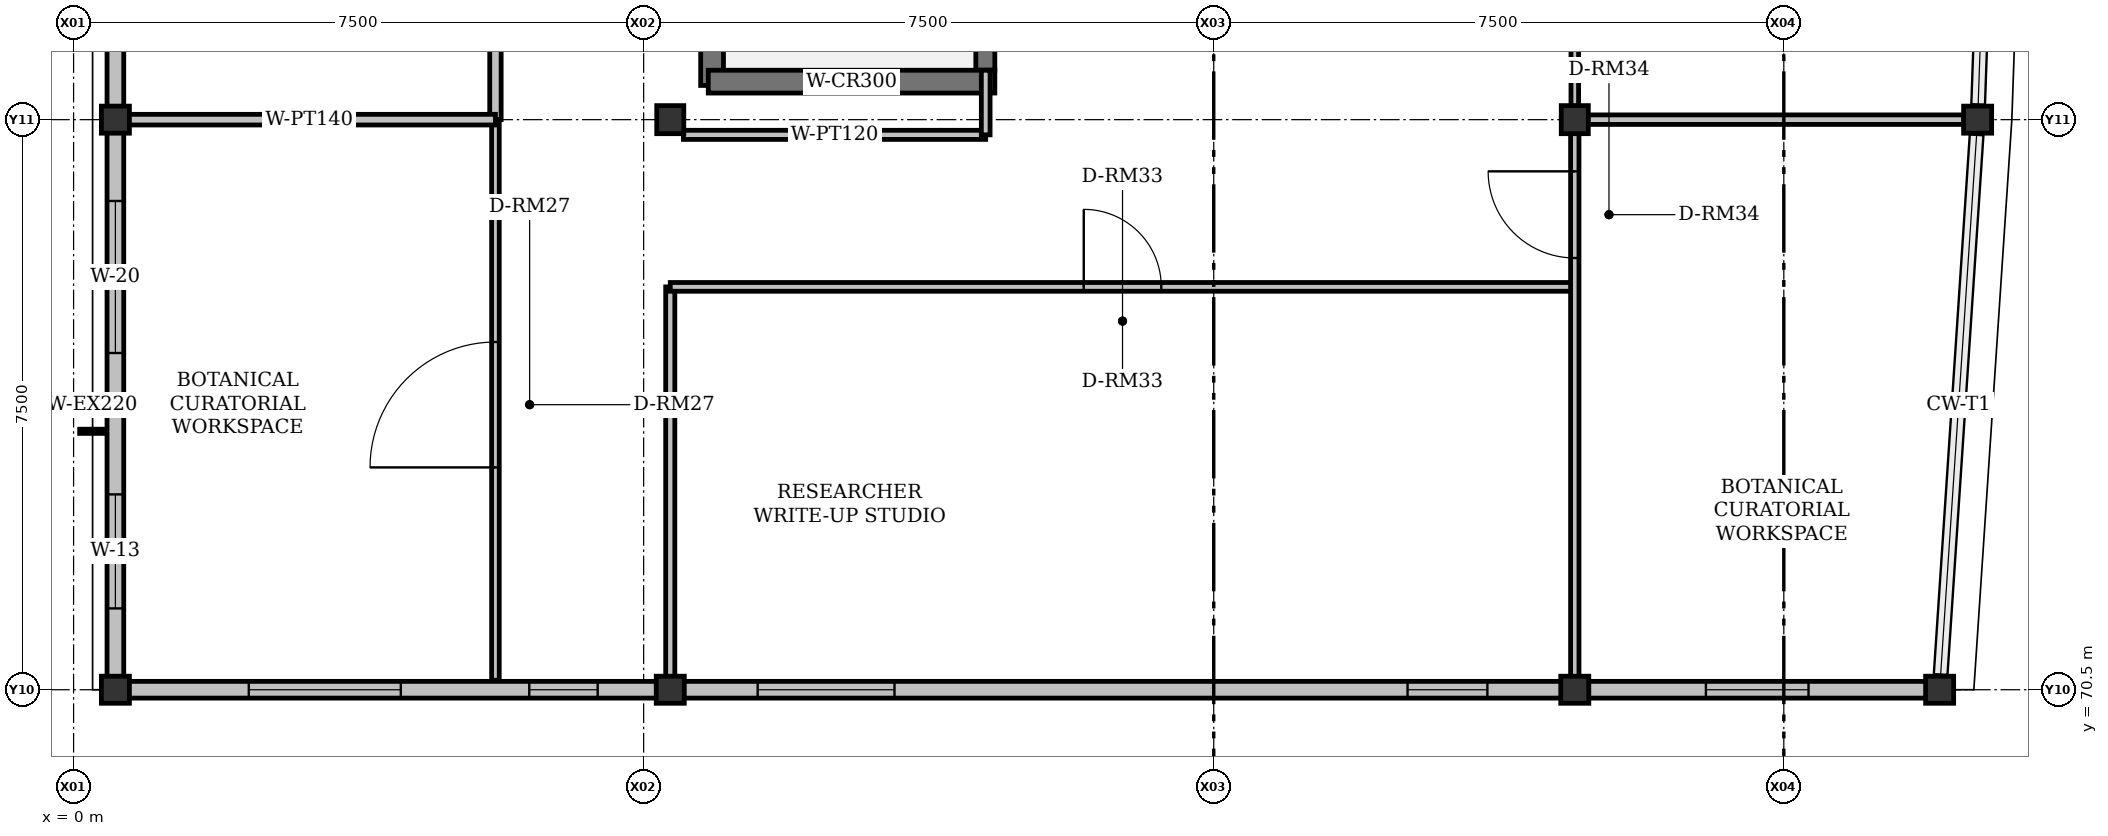
"""IFC4 building model, lengths in metres.
Left out: names, types, materials, properties, quantities, classifications, styles, units other than length and angle.
Written with IfcOpenShell. Run it as: python <this file> out.ifc"""

import sys

from ifc_helpers import new_model, si_unit, direction, frame, frame_2d, origin, origin_2d, place, context, subcontext, project, spatial, rectangle, i_section, extrude, element, fill, save


model = new_model("IFC4")
c1 = context("Model", 3, precision=1e-05, world=origin(), true_north=direction((0.0, 1.0)))
c2 = subcontext(c1, "Body", "Model", "MODEL_VIEW")
j1 = project(units=[si_unit("LENGTHUNIT", "METRE"), si_unit("PLANEANGLEUNIT", "RADIAN")], contexts=[c1])
p1 = place(None, origin())
s1 = spatial("IfcSite", under=j1, at=p1, CompositionType="ELEMENT")
p2 = place(p1, origin())
s2 = spatial("IfcBuilding", under=s1, at=p2, CompositionType="ELEMENT")
p3 = place(p2, frame((0.0, 0.0, 51.9)))
s3 = spatial("IfcBuildingStorey", under=s2, at=p3, CompositionType="ELEMENT", Elevation=51.9)
for number, where, z_axis, x_axis in (
    (1, (0.55, 70.5, 0.0), (0.0, 0.0, 1.0), (1.0, 0.0, 0.0)),
    (2, (7.85, 70.5, 0.0), (0.0, 0.0, 1.0), (1.0, 0.0, 0.0)),
    (3, (19.75, 70.5, 0.0), (0.0, 0.0, 1.0), (1.0, 0.0, 0.0)),
    (4, (24.55, 70.5, 0.0), (0.0, 0.0, 1.0), (1.0, 0.0, 0.0)),
    (5, (0.55, 78.0, 0.0), (0.0, 0.0, 1.0), (1.0, 0.0, 0.0)),
    (6, (7.85, 78.0, 0.0), (0.0, 0.0, 1.0), (0.0, 1.0, 0.0)),
    (7, (19.75, 78.0, 0.0), (0.0, 0.0, 1.0), (0.0, 1.0, 0.0)),
    (8, (25.05, 78.0, 0.0), (0.0, 0.0, 1.0), (1.0, 0.0, 0.0)),
):
    element("IfcColumn", number, at=place(p3, frame(where, z_axis=z_axis, x_axis=x_axis)), inside=s3, PredefinedType="COLUMN", context=c2, shape_type="SweptSolid", body=[
        extrude(i_section(OverallWidth=0.369, OverallDepth=0.356, WebThickness=0.011, FlangeThickness=0.018, FilletRadius=0.015, at=origin_2d()), origin(), (0.0, 0.0, 1.0), 4.2),
    ])
p4 = place(p3, frame((0.55, 70.5, 0.0), z_axis=(0.0, 0.0, 1.0), x_axis=(0.0, 1.0, 0.0)))
e9 = element("IfcWall", 9, at=p4, inside=s3, PredefinedType="SOLIDWALL", context=c2, shape_type="SweptSolid", body=[
    extrude(rectangle(XDim=7.5, YDim=0.22, at=frame_2d((3.75, 0.0))), origin(), (0.0, 0.0, 1.0), 3.577),
])
p5 = place(p4, frame((1.07, 0.0, 0.92)))
e10 = element("IfcOpeningElement", 10, at=p5, cuts=e9, PredefinedType="OPENING", context=c2, shape_type="SweptSolid", body=[
    extrude(rectangle(XDim=1.5, YDim=1.7, at=frame_2d((0.75, 0.85))), frame((0.0, 0.11, 0.0), z_axis=(0.0, -1.0, 0.0), x_axis=(1.0, 0.0, 0.0)), (0.0, 0.0, 1.0), 0.22),
])
p6 = place(p4, frame((4.43, 0.0, 0.92)))
e11 = element("IfcOpeningElement", 11, at=p6, cuts=e9, PredefinedType="OPENING", context=c2, shape_type="SweptSolid", body=[
    extrude(rectangle(XDim=2.0, YDim=1.35, at=frame_2d((1.0, 0.675))), frame((0.0, 0.11, 0.0), z_axis=(0.0, -1.0, 0.0), x_axis=(1.0, 0.0, 0.0)), (0.0, 0.0, 1.0), 0.22),
])
p7 = place(p3, frame((0.55, 78.0, 0.0), z_axis=(0.0, 0.0, 1.0), x_axis=(0.0, 1.0, 0.0)))
e12 = element("IfcWall", 12, at=p7, inside=s3, PredefinedType="SOLIDWALL", context=c2, shape_type="SweptSolid", body=[
    extrude(rectangle(XDim=7.2, YDim=0.22, at=frame_2d((3.6, 0.0))), origin(), (0.0, 0.0, 1.0), 3.577),
])
p8 = place(p7, frame((1.07, 0.0, 0.92)))
e13 = element("IfcOpeningElement", 13, at=p8, cuts=e12, PredefinedType="OPENING", context=c2, shape_type="SweptSolid", body=[
    extrude(rectangle(XDim=1.8, YDim=1.7, at=frame_2d((0.9, 0.85))), frame((0.0, 0.11, 0.0), z_axis=(0.0, -1.0, 0.0), x_axis=(1.0, 0.0, 0.0)), (0.0, 0.0, 1.0), 0.22),
])
p9 = place(p7, frame((4.93, 0.0, 0.92)))
e14 = element("IfcOpeningElement", 14, at=p9, cuts=e12, PredefinedType="OPENING", context=c2, shape_type="SweptSolid", body=[
    extrude(rectangle(XDim=1.2, YDim=1.4, at=frame_2d((0.6, 0.7))), frame((0.0, 0.11, 0.0), z_axis=(0.0, -1.0, 0.0), x_axis=(1.0, 0.0, 0.0)), (0.0, 0.0, 1.0), 0.22),
])
p10 = place(p3, frame((7.85, 70.5, 0.0), z_axis=(0.0, 0.0, 1.0), x_axis=(-1.0, 0.0, 0.0)))
e15 = element("IfcWall", 15, at=p10, inside=s3, PredefinedType="SOLIDWALL", context=c2, shape_type="SweptSolid", body=[
    extrude(rectangle(XDim=7.3, YDim=0.22, at=frame_2d((3.65, 0.0))), origin(), (0.0, 0.0, 1.0), 3.577),
])
p11 = place(p10, frame((0.955, 0.0, 0.92)))
e16 = element("IfcOpeningElement", 16, at=p11, cuts=e15, PredefinedType="OPENING", context=c2, shape_type="SweptSolid", body=[
    extrude(rectangle(XDim=0.9, YDim=1.3, at=frame_2d((0.45, 0.65))), frame((0.0, 0.11, 0.0), z_axis=(0.0, -1.0, 0.0), x_axis=(1.0, 0.0, 0.0)), (0.0, 0.0, 1.0), 0.22),
])
p12 = place(p10, frame((3.545, 0.0, 0.92)))
e17 = element("IfcOpeningElement", 17, at=p12, cuts=e15, PredefinedType="OPENING", context=c2, shape_type="SweptSolid", body=[
    extrude(rectangle(XDim=2.0, YDim=1.35, at=frame_2d((1.0, 0.675))), frame((0.0, 0.11, 0.0), z_axis=(0.0, -1.0, 0.0), x_axis=(1.0, 0.0, 0.0)), (0.0, 0.0, 1.0), 0.22),
])
p13 = place(p3, frame((19.75, 70.5, 0.0), z_axis=(0.0, 0.0, 1.0), x_axis=(-1.0, 0.0, 0.0)))
e18 = element("IfcWall", 18, at=p13, inside=s3, PredefinedType="SOLIDWALL", context=c2, shape_type="SweptSolid", body=[
    extrude(rectangle(XDim=11.9, YDim=0.22, at=frame_2d((5.95, 0.0))), origin(), (0.0, 0.0, 1.0), 3.577),
])
p14 = place(p13, frame((1.15, 0.0, 0.92)))
e19 = element("IfcOpeningElement", 19, at=p14, cuts=e18, PredefinedType="OPENING", context=c2, shape_type="SweptSolid", body=[
    extrude(rectangle(XDim=1.05, YDim=1.3, at=frame_2d((0.525, 0.65))), frame((0.0, 0.11, 0.0), z_axis=(0.0, -1.0, 0.0), x_axis=(1.0, 0.0, 0.0)), (0.0, 0.0, 1.0), 0.22),
])
p15 = place(p13, frame((8.95, 0.0, 0.92)))
e20 = element("IfcOpeningElement", 20, at=p15, cuts=e18, PredefinedType="OPENING", context=c2, shape_type="SweptSolid", body=[
    extrude(rectangle(XDim=1.8, YDim=1.4, at=frame_2d((0.9, 0.7))), frame((0.0, 0.11, 0.0), z_axis=(0.0, -1.0, 0.0), x_axis=(1.0, 0.0, 0.0)), (0.0, 0.0, 1.0), 0.22),
])
p16 = place(p3, frame((24.55, 70.5, 0.0), z_axis=(0.0, 0.0, 1.0), x_axis=(-1.0, 0.0, 0.0)))
e21 = element("IfcWall", 21, at=p16, inside=s3, PredefinedType="SOLIDWALL", context=c2, shape_type="SweptSolid", body=[
    extrude(rectangle(XDim=4.8, YDim=0.22, at=frame_2d((2.4, 0.0))), origin(), (0.0, 0.0, 1.0), 3.577),
])
p17 = place(p16, frame((1.725, 0.0, 0.92)))
e22 = element("IfcOpeningElement", 22, at=p17, cuts=e21, PredefinedType="OPENING", context=c2, shape_type="SweptSolid", body=[
    extrude(rectangle(XDim=1.35, YDim=1.4, at=frame_2d((0.675, 0.7))), frame((0.0, 0.11, 0.0), z_axis=(0.0, -1.0, 0.0), x_axis=(1.0, 0.0, 0.0)), (0.0, 0.0, 1.0), 0.22),
])
p18 = place(p3, frame((8.4, 78.45, 0.0), z_axis=(0.0, 0.0, 1.0), x_axis=(0.0, 1.0, 0.0)))
e23 = element("IfcWall", 23, at=p18, inside=s3, PredefinedType="SHEAR", context=c2, shape_type="SweptSolid", body=[
    extrude(rectangle(XDim=8.175, YDim=0.3, at=frame_2d((4.087, 0.0))), origin(), (0.0, 0.0, 1.0), 4.2),
])
p19 = place(p3, frame((11.995, 78.65, 0.0), z_axis=(0.0, 0.0, 1.0), x_axis=(0.0, 1.0, 0.0)))
e24 = element("IfcWall", 24, at=p19, inside=s3, PredefinedType="SHEAR", context=c2, shape_type="SweptSolid", body=[
    extrude(rectangle(XDim=7.85, YDim=0.25, at=frame_2d((3.925, 0.0))), origin(), (0.0, 0.0, 1.0), 4.2),
])
p20 = place(p3, frame((8.35, 78.5, 0.0), z_axis=(0.0, 0.0, 1.0), x_axis=(1.0, 0.0, 0.0)))
e25 = element("IfcWall", 25, at=p20, inside=s3, PredefinedType="SHEAR", context=c2, shape_type="SweptSolid", body=[
    extrude(rectangle(XDim=3.77, YDim=0.3, at=frame_2d((1.885, 0.0))), origin(), (0.0, 0.0, 1.0), 4.2),
])
p21 = place(p3, frame((8.023, 77.8, 0.0), z_axis=(0.0, 0.0, 1.0), x_axis=(1.0, 0.0, 0.0)))
e26 = element("IfcWall", 26, at=p21, inside=s3, PredefinedType="PARTITIONING", context=c2, shape_type="SweptSolid", body=[
    extrude(rectangle(XDim=3.977, YDim=0.12, at=frame_2d((1.989, 0.0))), origin(), (0.0, 0.0, 1.0), 3.451),
])
p22 = place(p3, frame((12.0, 77.8, 0.0), z_axis=(0.0, 0.0, 1.0), x_axis=(0.0, 1.0, 0.0)))
e27 = element("IfcWall", 27, at=p22, inside=s3, PredefinedType="PARTITIONING", context=c2, shape_type="SweptSolid", body=[
    extrude(rectangle(XDim=0.85, YDim=0.115, at=frame_2d((0.425, 0.0))), origin(), (0.0, 0.0, 1.0), 3.451),
])
p23 = place(p3, frame((5.55, 70.625, 0.0), z_axis=(0.0, 0.0, 1.0), x_axis=(0.0, 1.0, 0.0)))
e28 = element("IfcWall", 28, at=p23, inside=s3, PredefinedType="PARTITIONING", context=c2, shape_type="SweptSolid", body=[
    extrude(rectangle(XDim=7.375, YDim=0.1, at=frame_2d((3.688, 0.0))), origin(), (0.0, 0.0, 1.0), 3.451),
])
p24 = place(p23, frame((2.8, 0.0, 0.0)))
e29 = element("IfcOpeningElement", 29, at=p24, cuts=e28, PredefinedType="OPENING", context=c2, shape_type="SweptSolid", body=[
    extrude(rectangle(XDim=1.65, YDim=2.3, at=frame_2d((0.825, 1.15))), frame((0.0, 0.05, 0.0), z_axis=(0.0, -1.0, 0.0), x_axis=(1.0, 0.0, 0.0)), (0.0, 0.0, 1.0), 0.1),
])
p25 = place(p3, frame((5.55, 78.0, 0.0), z_axis=(0.0, 0.0, 1.0), x_axis=(0.0, 1.0, 0.0)))
e30 = element("IfcWall", 30, at=p25, inside=s3, PredefinedType="PARTITIONING", context=c2, shape_type="SweptSolid", body=[
    extrude(rectangle(XDim=14.4, YDim=0.15, at=frame_2d((7.2, 0.0))), origin(), (0.0, 0.0, 1.0), 3.451),
])
p26 = place(p25, frame((6.325, 0.0, 0.0)))
e31 = element("IfcOpeningElement", 31, at=p26, cuts=e30, PredefinedType="OPENING", context=c2, shape_type="SweptSolid", body=[
    extrude(rectangle(XDim=1.75, YDim=2.35, at=frame_2d((0.875, 1.175))), frame((0.0, 0.075, 0.0), z_axis=(0.0, -1.0, 0.0), x_axis=(1.0, 0.0, 0.0)), (0.0, 0.0, 1.0), 0.15),
])
p27 = place(p25, frame((8.925, 0.0, 0.92)))
e32 = element("IfcOpeningElement", 32, at=p27, cuts=e30, PredefinedType="OPENING", context=c2, shape_type="SweptSolid", body=[
    extrude(rectangle(XDim=1.2, YDim=1.2, at=frame_2d((0.6, 0.6))), frame((0.0, 0.075, 0.0), z_axis=(0.0, -1.0, 0.0), x_axis=(1.0, 0.0, 0.0)), (0.0, 0.0, 1.0), 0.15),
])
p28 = place(p3, frame((0.65, 78.0, 0.0), z_axis=(0.0, 0.0, 1.0), x_axis=(1.0, 0.0, 0.0)))
e33 = element("IfcWall", 33, at=p28, inside=s3, PredefinedType="PARTITIONING", context=c2, shape_type="SweptSolid", body=[
    extrude(rectangle(XDim=4.9, YDim=0.14, at=frame_2d((2.45, 0.0))), origin(), (0.0, 0.0, 1.0), 3.451),
])
p29 = place(p3, frame((19.75, 78.179, 0.0), z_axis=(0.0, 0.0, 1.0), x_axis=(0.0, 1.0, 0.0)))
e34 = element("IfcWall", 34, at=p29, inside=s3, PredefinedType="PARTITIONING", context=c2, shape_type="SweptSolid", body=[
    extrude(rectangle(XDim=6.848, YDim=0.1, at=frame_2d((3.424, 0.0))), origin(), (0.0, 0.0, 1.0), 3.527),
])
p30 = place(p3, frame((24.871, 78.0, 0.0), z_axis=(0.0, 0.0, 1.0), x_axis=(-1.0, 0.0, 0.0)))
e35 = element("IfcWall", 35, at=p30, inside=s3, PredefinedType="PARTITIONING", context=c2, shape_type="SweptSolid", body=[
    extrude(rectangle(XDim=4.948, YDim=0.125, at=frame_2d((2.474, 0.0))), origin(), (0.0, 0.0, 1.0), 3.451),
])
p31 = place(p3, frame((7.85, 70.673, 0.0), z_axis=(0.0, 0.0, 1.0), x_axis=(0.0, 1.0, 0.0)))
e36 = element("IfcWall", 36, at=p31, inside=s3, PredefinedType="PARTITIONING", context=c2, shape_type="SweptSolid", body=[
    extrude(rectangle(XDim=5.127, YDim=0.12, at=frame_2d((2.563, 0.0))), origin(), (0.0, 0.0, 1.0), 3.527),
])
p32 = place(p3, frame((7.85, 75.8, 0.0), z_axis=(0.0, 0.0, 1.0), x_axis=(1.0, 0.0, 0.0)))
e37 = element("IfcWall", 37, at=p32, inside=s3, PredefinedType="PARTITIONING", context=c2, shape_type="SweptSolid", body=[
    extrude(rectangle(XDim=11.9, YDim=0.115, at=frame_2d((5.95, 0.0))), origin(), (0.0, 0.0, 1.0), 3.527),
])
p33 = place(p32, frame((5.44, 0.0, 0.0)))
e38 = element("IfcOpeningElement", 38, at=p33, cuts=e37, PredefinedType="OPENING", context=c2, shape_type="SweptSolid", body=[
    extrude(rectangle(XDim=1.02, YDim=2.08, at=frame_2d((0.51, 1.04))), frame((0.0, 0.058, 0.0), z_axis=(0.0, -1.0, 0.0), x_axis=(1.0, 0.0, 0.0)), (0.0, 0.0, 1.0), 0.115),
])
p34 = place(p3, frame((19.75, 70.673, 0.0), z_axis=(0.0, 0.0, 1.0), x_axis=(0.0, 1.0, 0.0)))
e39 = element("IfcWall", 39, at=p34, inside=s3, PredefinedType="PARTITIONING", context=c2, shape_type="SweptSolid", body=[
    extrude(rectangle(XDim=7.147, YDim=0.11, at=frame_2d((3.574, 0.0))), origin(), (0.0, 0.0, 1.0), 3.527),
])
p35 = place(p34, frame((5.507, 0.0, 0.0)))
e40 = element("IfcOpeningElement", 40, at=p35, cuts=e39, PredefinedType="OPENING", context=c2, shape_type="SweptSolid", body=[
    extrude(rectangle(XDim=1.14, YDim=2.18, at=frame_2d((0.57, 1.09))), frame((0.0, 0.055, 0.0), z_axis=(0.0, -1.0, 0.0), x_axis=(1.0, 0.0, 0.0)), (0.0, 0.0, 1.0), 0.11),
])
p36 = place(p5, origin())
e41 = element("IfcWindow", 41, at=p36, inside=s3, PartitioningType="SINGLE_PANEL", PredefinedType="WINDOW", context=c2, shape_type="SweptSolid", body=[
    extrude(rectangle(XDim=1.5, YDim=1.7, at=frame_2d((0.75, 0.85))), frame((0.0, 0.03, 0.0), z_axis=(0.0, -1.0, 0.0), x_axis=(1.0, 0.0, 0.0)), (0.0, 0.0, 1.0), 0.06),
])
fill(e10, e41)
p37 = place(p6, origin())
e42 = element("IfcWindow", 42, at=p37, inside=s3, PartitioningType="DOUBLE_PANEL_VERTICAL", PredefinedType="WINDOW", context=c2, shape_type="SweptSolid", body=[
    extrude(rectangle(XDim=2.0, YDim=1.35, at=frame_2d((1.0, 0.675))), frame((0.0, 0.03, 0.0), z_axis=(0.0, -1.0, 0.0), x_axis=(1.0, 0.0, 0.0)), (0.0, 0.0, 1.0), 0.06),
])
fill(e11, e42)
p38 = place(p11, origin())
e43 = element("IfcWindow", 43, at=p38, inside=s3, PartitioningType="SINGLE_PANEL", PredefinedType="WINDOW", context=c2, shape_type="SweptSolid", body=[
    extrude(rectangle(XDim=0.9, YDim=1.3, at=frame_2d((0.45, 0.65))), frame((0.0, 0.03, 0.0), z_axis=(0.0, -1.0, 0.0), x_axis=(1.0, 0.0, 0.0)), (0.0, 0.0, 1.0), 0.06),
])
fill(e16, e43)
p39 = place(p12, origin())
e44 = element("IfcWindow", 44, at=p39, inside=s3, PartitioningType="DOUBLE_PANEL_VERTICAL", PredefinedType="WINDOW", context=c2, shape_type="SweptSolid", body=[
    extrude(rectangle(XDim=2.0, YDim=1.35, at=frame_2d((1.0, 0.675))), frame((0.0, 0.03, 0.0), z_axis=(0.0, -1.0, 0.0), x_axis=(1.0, 0.0, 0.0)), (0.0, 0.0, 1.0), 0.06),
])
fill(e17, e44)
p40 = place(p14, origin())
e45 = element("IfcWindow", 45, at=p40, inside=s3, PartitioningType="SINGLE_PANEL", PredefinedType="WINDOW", context=c2, shape_type="SweptSolid", body=[
    extrude(rectangle(XDim=1.05, YDim=1.3, at=frame_2d((0.525, 0.65))), frame((0.0, 0.03, 0.0), z_axis=(0.0, -1.0, 0.0), x_axis=(1.0, 0.0, 0.0)), (0.0, 0.0, 1.0), 0.06),
])
fill(e19, e45)
p41 = place(p15, origin())
e46 = element("IfcWindow", 46, at=p41, inside=s3, PartitioningType="DOUBLE_PANEL_VERTICAL", PredefinedType="WINDOW", context=c2, shape_type="SweptSolid", body=[
    extrude(rectangle(XDim=1.8, YDim=1.4, at=frame_2d((0.9, 0.7))), frame((0.0, 0.03, 0.0), z_axis=(0.0, -1.0, 0.0), x_axis=(1.0, 0.0, 0.0)), (0.0, 0.0, 1.0), 0.06),
])
fill(e20, e46)
p42 = place(p17, origin())
e47 = element("IfcWindow", 47, at=p42, inside=s3, PartitioningType="SINGLE_PANEL", PredefinedType="WINDOW", context=c2, shape_type="SweptSolid", body=[
    extrude(rectangle(XDim=1.35, YDim=1.4, at=frame_2d((0.675, 0.7))), frame((0.0, 0.03, 0.0), z_axis=(0.0, -1.0, 0.0), x_axis=(1.0, 0.0, 0.0)), (0.0, 0.0, 1.0), 0.06),
])
fill(e22, e47)
p43 = place(p24, origin())
e48 = element("IfcDoor", 48, at=p43, inside=s3, OperationType="SINGLE_SWING_LEFT", PredefinedType="DOOR", context=c2, shape_type="SweptSolid", body=[
    extrude(rectangle(XDim=1.65, YDim=2.3, at=frame_2d((0.825, 1.15))), frame((0.0, 0.025, 0.0), z_axis=(0.0, -1.0, 0.0), x_axis=(1.0, 0.0, 0.0)), (0.0, 0.0, 1.0), 0.05),
])
fill(e29, e48)
p44 = place(p33, origin())
e49 = element("IfcDoor", 49, at=p44, inside=s3, OperationType="SINGLE_SWING_LEFT", PredefinedType="DOOR", context=c2, shape_type="SweptSolid", body=[
    extrude(rectangle(XDim=1.02, YDim=2.08, at=frame_2d((0.51, 1.04))), frame((0.0, 0.025, 0.0), z_axis=(0.0, -1.0, 0.0), x_axis=(1.0, 0.0, 0.0)), (0.0, 0.0, 1.0), 0.05),
])
fill(e38, e49)
p45 = place(p35, origin())
e50 = element("IfcDoor", 50, at=p45, inside=s3, OperationType="SINGLE_SWING_RIGHT", PredefinedType="DOOR", context=c2, shape_type="SweptSolid", body=[
    extrude(rectangle(XDim=1.14, YDim=2.18, at=frame_2d((0.57, 1.09))), frame((0.0, 0.025, 0.0), z_axis=(0.0, -1.0, 0.0), x_axis=(1.0, 0.0, 0.0)), (0.0, 0.0, 1.0), 0.05),
])
fill(e40, e50)
save(model, sys.argv[1])
